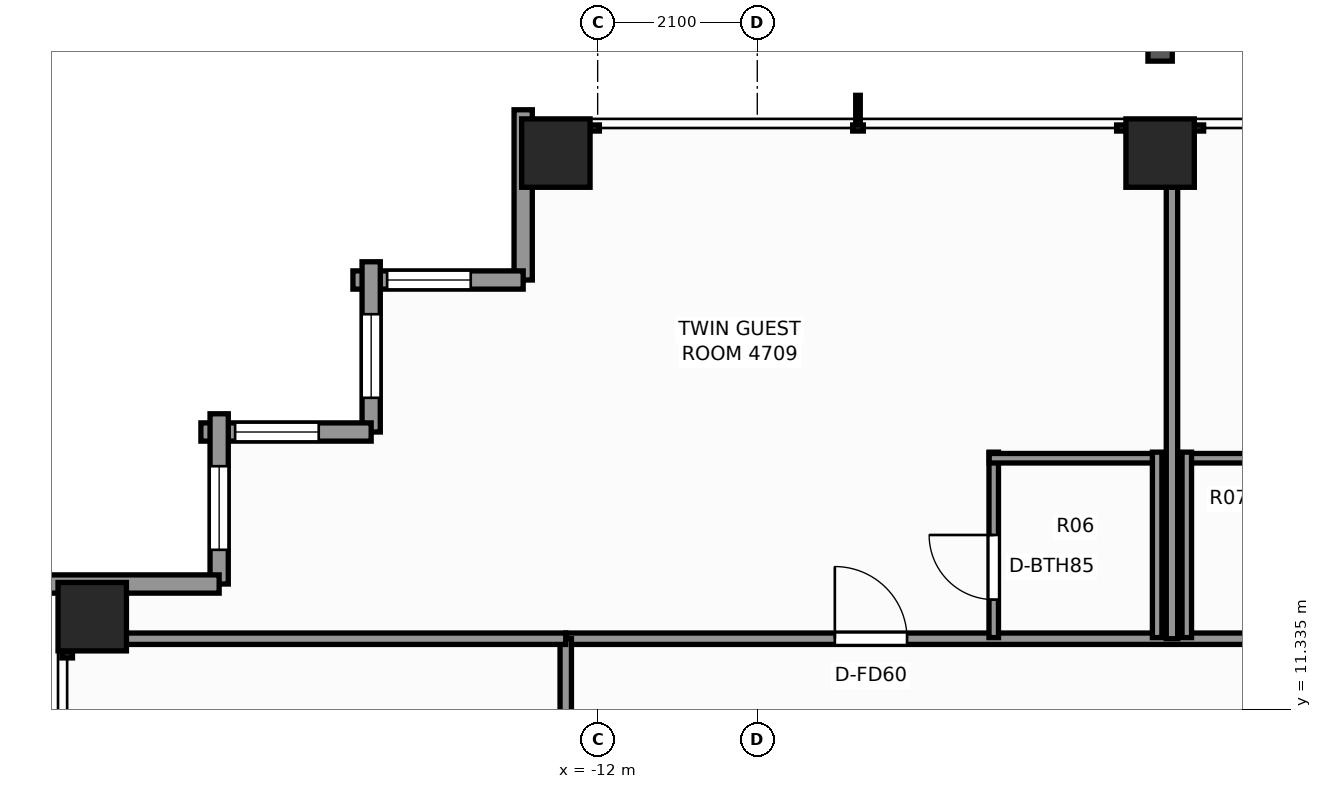
"""IFC4 building model, lengths in metres.
Left out: names, types, materials, properties, quantities, classifications, styles, units other than length and angle.
Written with IfcOpenShell. Run it as: python <this file> out.ifc"""

import sys

from ifc_helpers import new_model, si_unit, direction, frame, frame_2d, origin, origin_2d, place, context, subcontext, project, spatial, rectangle, extrude, element, fill, save


model = new_model("IFC4")
c1 = context("Model", 3, precision=1e-05, world=origin(), true_north=direction((0.0, 1.0)))
c2 = subcontext(c1, "Body", "Model", "MODEL_VIEW")
j1 = project(units=[si_unit("LENGTHUNIT", "METRE"), si_unit("PLANEANGLEUNIT", "RADIAN")], contexts=[c1])
p1 = place(None, origin())
s1 = spatial("IfcSite", under=j1, at=p1, CompositionType="ELEMENT")
p2 = place(p1, origin())
s2 = spatial("IfcBuilding", under=s1, at=p2, CompositionType="ELEMENT")
p3 = place(p2, frame((0.0, 0.0, 163.5)))
s3 = spatial("IfcBuildingStorey", under=s2, at=p3, CompositionType="ELEMENT", Elevation=163.5)
for number, where, z_axis, x_axis in (
    (1, (-12.55, 18.65, 0.0), (0.0, 0.0, 1.0), (1.0, 0.0, 0.0)),
    (2, (-4.6, 18.65, 0.0), (0.0, 0.0, 1.0), (1.0, 0.0, 0.0)),
    (3, (-18.65, 12.55, 0.0), (0.0, 0.0, 1.0), (1.0, 0.0, 0.0)),
):
    element("IfcColumn", number, at=place(p3, frame(where, z_axis=z_axis, x_axis=x_axis)), inside=s3, PredefinedType="COLUMN", context=c2, shape_type="SweptSolid", body=[
        extrude(rectangle(XDim=0.9, YDim=0.9, at=origin_2d()), origin(), (0.0, 0.0, 1.0), 3.3),
    ])
p4 = place(p3, frame((-12.98, 16.98, 0.0), z_axis=(0.0, 0.0, 1.0), x_axis=(0.0, 1.0, 0.0)))
e4 = element("IfcWall", 4, at=p4, inside=s3, PredefinedType="STANDARD", context=c2, shape_type="SweptSolid", body=[
    extrude(rectangle(XDim=2.24, YDim=0.24, at=frame_2d((1.12, 0.0))), origin(), (0.0, 0.0, 1.0), 2.483),
])
p5 = place(p3, frame((-15.22, 16.98, 0.0), z_axis=(0.0, 0.0, 1.0), x_axis=(1.0, 0.0, 0.0)))
e5 = element("IfcWall", 5, at=p5, inside=s3, PredefinedType="STANDARD", context=c2, shape_type="SweptSolid", body=[
    extrude(rectangle(XDim=2.24, YDim=0.24, at=frame_2d((1.12, 0.0))), origin(), (0.0, 0.0, 1.0), 2.483),
])
p6 = place(p5, frame((0.45, 0.0, 0.65)))
e6 = element("IfcOpeningElement", 6, at=p6, cuts=e5, PredefinedType="OPENING", context=c2, shape_type="SweptSolid", body=[
    extrude(rectangle(XDim=1.1, YDim=1.45, at=frame_2d((0.55, 0.725))), frame((0.0, 0.13, 0.0), z_axis=(0.0, -1.0, 0.0), x_axis=(1.0, 0.0, 0.0)), (0.0, 0.0, 1.0), 0.26),
])
p7 = place(p3, frame((-14.98, 14.98, 0.0), z_axis=(0.0, 0.0, 1.0), x_axis=(0.0, 1.0, 0.0)))
e7 = element("IfcWall", 7, at=p7, inside=s3, PredefinedType="STANDARD", context=c2, shape_type="SweptSolid", body=[
    extrude(rectangle(XDim=2.24, YDim=0.24, at=frame_2d((1.12, 0.0))), origin(), (0.0, 0.0, 1.0), 2.483),
])
p8 = place(p7, frame((0.45, 0.0, 0.65)))
e8 = element("IfcOpeningElement", 8, at=p8, cuts=e7, PredefinedType="OPENING", context=c2, shape_type="SweptSolid", body=[
    extrude(rectangle(XDim=1.1, YDim=1.45, at=frame_2d((0.55, 0.725))), frame((0.0, 0.13, 0.0), z_axis=(0.0, -1.0, 0.0), x_axis=(1.0, 0.0, 0.0)), (0.0, 0.0, 1.0), 0.26),
])
p9 = place(p3, frame((-17.22, 14.98, 0.0), z_axis=(0.0, 0.0, 1.0), x_axis=(1.0, 0.0, 0.0)))
e9 = element("IfcWall", 9, at=p9, inside=s3, PredefinedType="STANDARD", context=c2, shape_type="SweptSolid", body=[
    extrude(rectangle(XDim=2.24, YDim=0.24, at=frame_2d((1.12, 0.0))), origin(), (0.0, 0.0, 1.0), 2.483),
])
p10 = place(p9, frame((0.45, 0.0, 0.65)))
e10 = element("IfcOpeningElement", 10, at=p10, cuts=e9, PredefinedType="OPENING", context=c2, shape_type="SweptSolid", body=[
    extrude(rectangle(XDim=1.1, YDim=1.45, at=frame_2d((0.55, 0.725))), frame((0.0, 0.13, 0.0), z_axis=(0.0, -1.0, 0.0), x_axis=(1.0, 0.0, 0.0)), (0.0, 0.0, 1.0), 0.26),
])
p11 = place(p3, frame((-16.98, 12.98, 0.0), z_axis=(0.0, 0.0, 1.0), x_axis=(0.0, 1.0, 0.0)))
e11 = element("IfcWall", 11, at=p11, inside=s3, PredefinedType="STANDARD", context=c2, shape_type="SweptSolid", body=[
    extrude(rectangle(XDim=2.24, YDim=0.24, at=frame_2d((1.12, 0.0))), origin(), (0.0, 0.0, 1.0), 2.483),
])
p12 = place(p11, frame((0.45, 0.0, 0.65)))
e12 = element("IfcOpeningElement", 12, at=p12, cuts=e11, PredefinedType="OPENING", context=c2, shape_type="SweptSolid", body=[
    extrude(rectangle(XDim=1.1, YDim=1.45, at=frame_2d((0.55, 0.725))), frame((0.0, 0.13, 0.0), z_axis=(0.0, -1.0, 0.0), x_axis=(1.0, 0.0, 0.0)), (0.0, 0.0, 1.0), 0.26),
])
p13 = place(p3, frame((-19.22, 12.98, 0.0), z_axis=(0.0, 0.0, 1.0), x_axis=(1.0, 0.0, 0.0)))
e13 = element("IfcWall", 13, at=p13, inside=s3, PredefinedType="STANDARD", context=c2, shape_type="SweptSolid", body=[
    extrude(rectangle(XDim=2.24, YDim=0.24, at=frame_2d((1.12, 0.0))), origin(), (0.0, 0.0, 1.0), 2.483),
])
p14 = place(p3, frame((-12.42, 12.26, 0.0), z_axis=(0.0, 0.0, 1.0), x_axis=(1.0, 0.0, 0.0)))
e14 = element("IfcWall", 14, at=p14, inside=s3, PredefinedType="PARTITIONING", context=c2, shape_type="SweptSolid", body=[
    extrude(rectangle(XDim=24.84, YDim=0.15, at=frame_2d((12.42, 0.0))), origin(), (0.0, 0.0, 1.0), 2.389),
])
p15 = place(p14, frame((3.541, 0.0, 0.0)))
e15 = element("IfcOpeningElement", 15, at=p15, cuts=e14, PredefinedType="OPENING", context=c2, shape_type="SweptSolid", body=[
    extrude(rectangle(XDim=0.95, YDim=2.06, at=frame_2d((0.475, 1.03))), frame((0.0, 0.085, 0.0), z_axis=(0.0, -1.0, 0.0), x_axis=(1.0, 0.0, 0.0)), (0.0, 0.0, 1.0), 0.17),
])
p16 = place(p14, frame((13.975, 0.0, 0.0)))
e16 = element("IfcOpeningElement", 16, at=p16, cuts=e14, PredefinedType="OPENING", context=c2, shape_type="SweptSolid", body=[
    extrude(rectangle(XDim=0.95, YDim=2.06, at=frame_2d((0.475, 1.03))), frame((0.0, 0.085, 0.0), z_axis=(0.0, -1.0, 0.0), x_axis=(1.0, 0.0, 0.0)), (0.0, 0.0, 1.0), 0.17),
])
p17 = place(p14, frame((20.05, 0.0, 0.0)))
e17 = element("IfcOpeningElement", 17, at=p17, cuts=e14, PredefinedType="OPENING", context=c2, shape_type="SweptSolid", body=[
    extrude(rectangle(XDim=0.95, YDim=2.06, at=frame_2d((0.475, 1.03))), frame((0.0, 0.085, 0.0), z_axis=(0.0, -1.0, 0.0), x_axis=(1.0, 0.0, 0.0)), (0.0, 0.0, 1.0), 0.17),
])
p18 = place(p3, frame((-12.42, -12.58, 0.0), z_axis=(0.0, 0.0, 1.0), x_axis=(0.0, 1.0, 0.0)))
e18 = element("IfcWall", 18, at=p18, inside=s3, PredefinedType="PARTITIONING", context=c2, shape_type="SweptSolid", body=[
    extrude(rectangle(XDim=24.84, YDim=0.15, at=frame_2d((12.42, 0.0))), origin(), (0.0, 0.0, 1.0), 2.389),
])
p19 = place(p18, frame((4.595, 0.0, 0.0)))
e19 = element("IfcOpeningElement", 19, at=p19, cuts=e18, PredefinedType="OPENING", context=c2, shape_type="SweptSolid", body=[
    extrude(rectangle(XDim=0.9, YDim=2.06, at=frame_2d((0.45, 1.03))), frame((0.0, 0.085, 0.0), z_axis=(0.0, -1.0, 0.0), x_axis=(1.0, 0.0, 0.0)), (0.0, 0.0, 1.0), 0.17),
])
p20 = place(p18, frame((19.64, 0.0, 0.0)))
e20 = element("IfcOpeningElement", 20, at=p20, cuts=e18, PredefinedType="OPENING", context=c2, shape_type="SweptSolid", body=[
    extrude(rectangle(XDim=0.95, YDim=2.06, at=frame_2d((0.475, 1.03))), frame((0.0, 0.085, 0.0), z_axis=(0.0, -1.0, 0.0), x_axis=(1.0, 0.0, 0.0)), (0.0, 0.0, 1.0), 0.17),
])
p21 = place(p3, frame((-19.08, 12.26, 0.0), z_axis=(0.0, 0.0, 1.0), x_axis=(1.0, 0.0, 0.0)))
e21 = element("IfcWall", 21, at=p21, inside=s3, PredefinedType="PARTITIONING", context=c2, shape_type="SweptSolid", body=[
    extrude(rectangle(XDim=6.66, YDim=0.15, at=frame_2d((3.33, 0.0))), origin(), (0.0, 0.0, 1.0), 2.389),
])
p22 = place(p3, frame((-4.444, 12.26, 0.0), z_axis=(0.0, 0.0, 1.0), x_axis=(0.0, 1.0, 0.0)))
e22 = element("IfcWall", 22, at=p22, inside=s3, PredefinedType="PARTITIONING", context=c2, shape_type="SweptSolid", body=[
    extrude(rectangle(XDim=6.82, YDim=0.15, at=frame_2d((3.41, 0.0))), origin(), (0.0, 0.0, 1.0), 2.389),
])
p23 = place(p3, frame((-6.789, 12.275, 0.0), z_axis=(0.0, 0.0, 1.0), x_axis=(0.0, 1.0, 0.0)))
e23 = element("IfcWall", 23, at=p23, inside=s3, PredefinedType="PARTITIONING", context=c2, shape_type="SweptSolid", body=[
    extrude(rectangle(XDim=2.44, YDim=0.125, at=frame_2d((1.22, 0.0))), origin(), (0.0, 0.0, 1.0), 3.1),
])
p24 = place(p23, frame((0.5, 0.0, 0.0)))
e24 = element("IfcOpeningElement", 24, at=p24, cuts=e23, PredefinedType="OPENING", context=c2, shape_type="SweptSolid", body=[
    extrude(rectangle(XDim=0.85, YDim=2.03, at=frame_2d((0.425, 1.015))), frame((0.0, 0.073, 0.0), z_axis=(0.0, -1.0, 0.0), x_axis=(1.0, 0.0, 0.0)), (0.0, 0.0, 1.0), 0.145),
])
p25 = place(p3, frame((-6.849, 14.635, 0.0), z_axis=(0.0, 0.0, 1.0), x_axis=(1.0, 0.0, 0.0)))
e25 = element("IfcWall", 25, at=p25, inside=s3, PredefinedType="PARTITIONING", context=c2, shape_type="SweptSolid", body=[
    extrude(rectangle(XDim=2.27, YDim=0.125, at=frame_2d((1.135, 0.0))), origin(), (0.0, 0.0, 1.0), 2.389),
])
p26 = place(p3, frame((-4.639, 12.275, 0.0), z_axis=(0.0, 0.0, 1.0), x_axis=(0.0, 1.0, 0.0)))
e26 = element("IfcWall", 26, at=p26, inside=s3, PredefinedType="PARTITIONING", context=c2, shape_type="SweptSolid", body=[
    extrude(rectangle(XDim=2.44, YDim=0.125, at=frame_2d((1.22, 0.0))), origin(), (0.0, 0.0, 1.0), 2.389),
])
p27 = place(p3, frame((-4.309, 14.635, 0.0), z_axis=(0.0, 0.0, 1.0), x_axis=(1.0, 0.0, 0.0)))
e27 = element("IfcWall", 27, at=p27, inside=s3, PredefinedType="PARTITIONING", context=c2, shape_type="SweptSolid", body=[
    extrude(rectangle(XDim=2.27, YDim=0.125, at=frame_2d((1.135, 0.0))), origin(), (0.0, 0.0, 1.0), 2.389),
])
p28 = place(p3, frame((-4.249, 12.275, 0.0), z_axis=(0.0, 0.0, 1.0), x_axis=(0.0, 1.0, 0.0)))
e28 = element("IfcWall", 28, at=p28, inside=s3, PredefinedType="PARTITIONING", context=c2, shape_type="SweptSolid", body=[
    extrude(rectangle(XDim=2.44, YDim=0.125, at=frame_2d((1.22, 0.0))), origin(), (0.0, 0.0, 1.0), 3.1),
])
p29 = place(p6, origin())
e29 = element("IfcWindow", 29, at=p29, inside=s3, PartitioningType="SINGLE_PANEL", PredefinedType="WINDOW", context=c2, shape_type="SweptSolid", body=[
    extrude(rectangle(XDim=1.1, YDim=1.45, at=frame_2d((0.55, 0.725))), frame((0.0, 0.03, 0.0), z_axis=(0.0, -1.0, 0.0), x_axis=(1.0, 0.0, 0.0)), (0.0, 0.0, 1.0), 0.06),
])
fill(e6, e29)
p30 = place(p8, origin())
e30 = element("IfcWindow", 30, at=p30, inside=s3, PartitioningType="SINGLE_PANEL", PredefinedType="WINDOW", context=c2, shape_type="SweptSolid", body=[
    extrude(rectangle(XDim=1.1, YDim=1.45, at=frame_2d((0.55, 0.725))), frame((0.0, 0.03, 0.0), z_axis=(0.0, -1.0, 0.0), x_axis=(1.0, 0.0, 0.0)), (0.0, 0.0, 1.0), 0.06),
])
fill(e8, e30)
p31 = place(p10, origin())
e31 = element("IfcWindow", 31, at=p31, inside=s3, PartitioningType="SINGLE_PANEL", PredefinedType="WINDOW", context=c2, shape_type="SweptSolid", body=[
    extrude(rectangle(XDim=1.1, YDim=1.45, at=frame_2d((0.55, 0.725))), frame((0.0, 0.03, 0.0), z_axis=(0.0, -1.0, 0.0), x_axis=(1.0, 0.0, 0.0)), (0.0, 0.0, 1.0), 0.06),
])
fill(e10, e31)
p32 = place(p12, origin())
e32 = element("IfcWindow", 32, at=p32, inside=s3, PartitioningType="SINGLE_PANEL", PredefinedType="WINDOW", context=c2, shape_type="SweptSolid", body=[
    extrude(rectangle(XDim=1.1, YDim=1.45, at=frame_2d((0.55, 0.725))), frame((0.0, 0.03, 0.0), z_axis=(0.0, -1.0, 0.0), x_axis=(1.0, 0.0, 0.0)), (0.0, 0.0, 1.0), 0.06),
])
fill(e12, e32)
p33 = place(p24, origin())
e33 = element("IfcDoor", 33, at=p33, inside=s3, OperationType="SINGLE_SWING_RIGHT", PredefinedType="DOOR", context=c2, shape_type="SweptSolid", body=[
    extrude(rectangle(XDim=0.85, YDim=2.03, at=frame_2d((0.425, 1.015))), frame((0.0, 0.025, 0.0), z_axis=(0.0, -1.0, 0.0), x_axis=(1.0, 0.0, 0.0)), (0.0, 0.0, 1.0), 0.05),
])
fill(e24, e33)
p34 = place(p15, origin())
e34 = element("IfcDoor", 34, at=p34, inside=s3, OperationType="SINGLE_SWING_LEFT", PredefinedType="DOOR", context=c2, shape_type="SweptSolid", body=[
    extrude(rectangle(XDim=0.95, YDim=2.06, at=frame_2d((0.475, 1.03))), frame((0.0, 0.025, 0.0), z_axis=(0.0, -1.0, 0.0), x_axis=(1.0, 0.0, 0.0)), (0.0, 0.0, 1.0), 0.05),
])
fill(e15, e34)
save(model, sys.argv[1])
